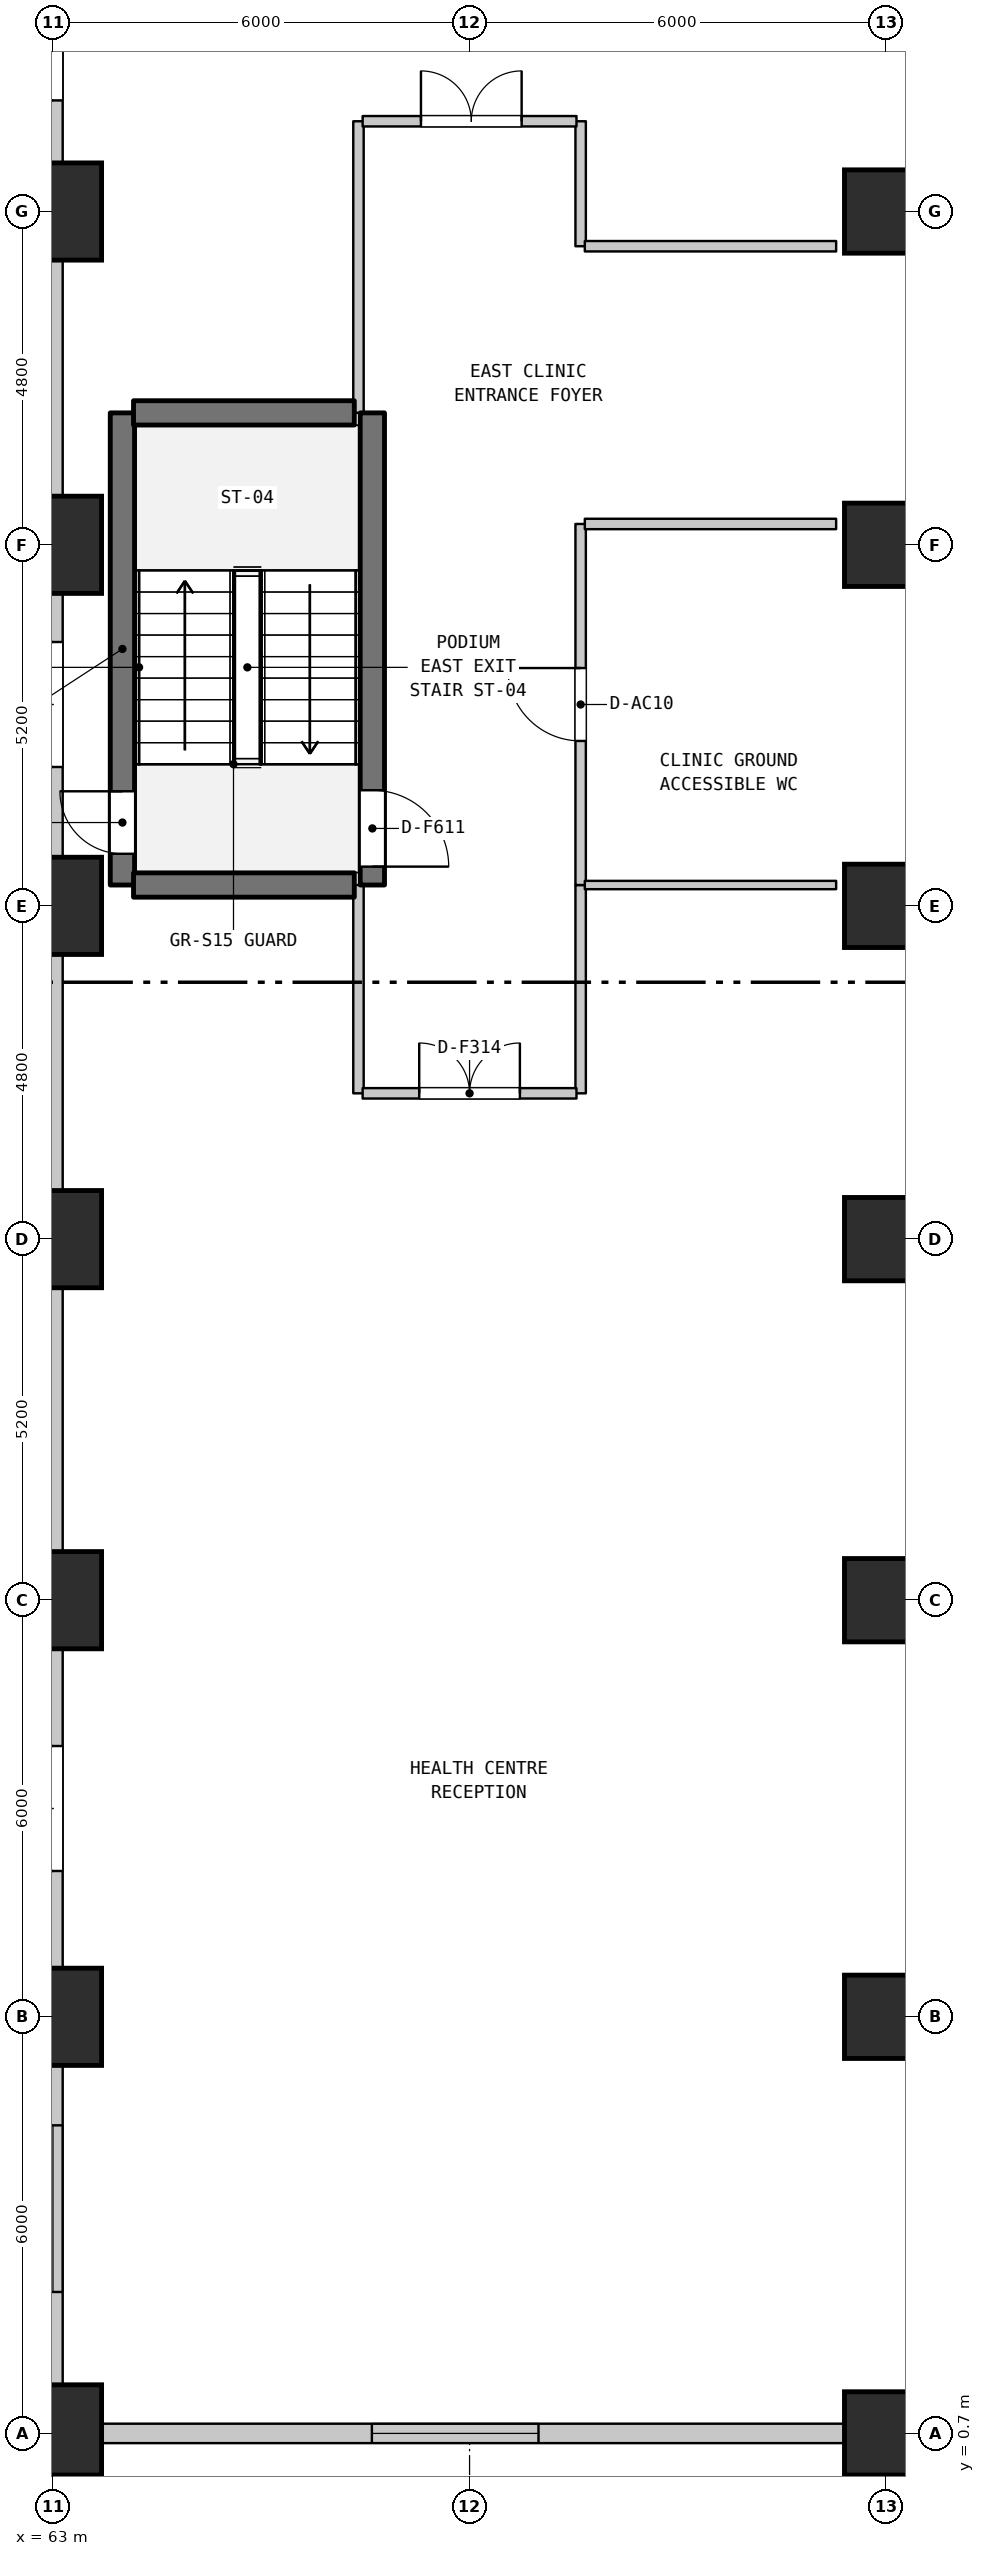
"""IFC4 building model, lengths in metres.
Left out: names, types, materials, properties, quantities, classifications, styles, units other than length and angle.
Written with IfcOpenShell. Run it as: python <this file> out.ifc"""

import sys

from ifc_helpers import new_model, si_unit, direction, frame, frame_2d, origin, origin_2d, place, context, subcontext, project, spatial, rectangle, extrude, element, fill, save


model = new_model("IFC4")
c1 = context("Model", 3, precision=1e-05, world=origin(), true_north=direction((0.0, 1.0)))
c2 = subcontext(c1, "Body", "Model", "MODEL_VIEW")
j1 = project(units=[si_unit("LENGTHUNIT", "METRE"), si_unit("PLANEANGLEUNIT", "RADIAN")], contexts=[c1])
p1 = place(None, origin())
s1 = spatial("IfcSite", under=j1, at=p1, CompositionType="ELEMENT")
p2 = place(p1, origin())
s2 = spatial("IfcBuilding", under=s1, at=p2, CompositionType="ELEMENT")
p3 = place(p2, origin())
s3 = spatial("IfcBuildingStorey", under=s2, at=p3, CompositionType="ELEMENT", Elevation=0.0)
for number, where, z_axis, x_axis in (
    (1, (63.0, 0.7, 0.0), (0.0, 0.0, 1.0), (1.0, 0.0, 0.0)),
    (2, (63.0, 6.7, 0.0), (0.0, 0.0, 1.0), (1.0, 0.0, 0.0)),
    (3, (63.0, 12.7, 0.0), (0.0, 0.0, 1.0), (1.0, 0.0, 0.0)),
    (4, (63.0, 17.9, 0.0), (0.0, 0.0, 1.0), (1.0, 0.0, 0.0)),
    (5, (63.0, 22.7, 0.0), (0.0, 0.0, 1.0), (1.0, 0.0, 0.0)),
    (6, (63.0, 27.9, 0.0), (0.0, 0.0, 1.0), (1.0, 0.0, 0.0)),
    (7, (63.0, 32.7, 0.0), (0.0, 0.0, 1.0), (1.0, 0.0, 0.0)),
):
    element("IfcColumn", number, at=place(p3, frame(where, z_axis=z_axis, x_axis=x_axis)), inside=s3, PredefinedType="PILASTER", context=c2, shape_type="SweptSolid", body=[
        extrude(rectangle(XDim=1.4, YDim=1.4, at=origin_2d()), origin(), (0.0, 0.0, 1.0), 6.5),
    ])
for number, where, z_axis, x_axis in (
    (8, (75.0, 0.7, 0.0), (0.0, 0.0, 1.0), (1.0, 0.0, 0.0)),
    (9, (75.0, 6.7, 0.0), (0.0, 0.0, 1.0), (1.0, 0.0, 0.0)),
    (10, (75.0, 12.7, 0.0), (0.0, 0.0, 1.0), (1.0, 0.0, 0.0)),
    (11, (75.0, 17.9, 0.0), (0.0, 0.0, 1.0), (1.0, 0.0, 0.0)),
    (12, (75.0, 22.7, 0.0), (0.0, 0.0, 1.0), (1.0, 0.0, 0.0)),
    (13, (75.0, 27.9, 0.0), (0.0, 0.0, 1.0), (1.0, 0.0, 0.0)),
    (14, (75.0, 32.7, 0.0), (0.0, 0.0, 1.0), (1.0, 0.0, 0.0)),
):
    element("IfcColumn", number, at=place(p3, frame(where, z_axis=z_axis, x_axis=x_axis)), inside=s3, PredefinedType="PILASTER", context=c2, shape_type="SweptSolid", body=[
        extrude(rectangle(XDim=1.2, YDim=1.2, at=origin_2d()), origin(), (0.0, 0.0, 1.0), 6.5),
    ])
p4 = place(p3, frame((76.707, 2.407, 0.0), z_axis=(0.0, 0.0, 1.0), x_axis=(-0.707106781187, -0.707106781187, 0.0)))
e15 = element("IfcWall", 15, at=p4, inside=s3, PredefinedType="STANDARD", context=c2, shape_type="SweptSolid", body=[
    extrude(rectangle(XDim=2.0, YDim=0.28, at=frame_2d((1.0, 0.0))), origin(), (0.0, 0.0, 1.0), 6.17),
])
p5 = place(p3, frame((75.293, 0.993, 0.0), z_axis=(0.0, 0.0, 1.0), x_axis=(-0.92383017907, -0.382802560388, 0.0)))
e16 = element("IfcWall", 16, at=p5, inside=s3, PredefinedType="STANDARD", context=c2, shape_type="SweptSolid", body=[
    extrude(rectangle(XDim=0.765, YDim=0.28, at=frame_2d((0.383, 0.0))), origin(), (0.0, 0.0, 1.0), 6.17),
])
p6 = place(p3, frame((74.586, 0.7, 0.0), z_axis=(0.0, 0.0, 1.0), x_axis=(-1.0, 0.0, 0.0)))
e17 = element("IfcWall", 17, at=p6, inside=s3, PredefinedType="STANDARD", context=c2, shape_type="SweptSolid", body=[
    extrude(rectangle(XDim=11.586, YDim=0.28, at=frame_2d((5.793, 0.0))), origin(), (0.0, 0.0, 1.0), 6.17),
])
p7 = place(p6, frame((4.593, 0.0, 0.9)))
e18 = element("IfcOpeningElement", 18, at=p7, cuts=e17, PredefinedType="OPENING", context=c2, shape_type="SweptSolid", body=[
    extrude(rectangle(XDim=2.4, YDim=2.4, at=frame_2d((1.2, 1.2))), frame((0.0, 0.15, 0.0), z_axis=(0.0, -1.0, 0.0), x_axis=(1.0, 0.0, 0.0)), (0.0, 0.0, 1.0), 0.3),
])
p8 = place(p3, frame((63.0, 0.7, 0.0), z_axis=(0.0, 0.0, 1.0), x_axis=(0.0, 1.0, 0.0)))
e19 = element("IfcWall", 19, at=p8, inside=s3, PredefinedType="STANDARD", context=c2, shape_type="SweptSolid", body=[
    extrude(rectangle(XDim=32.0, YDim=0.28, at=frame_2d((16.0, 0.0))), origin(), (0.0, 0.0, 1.0), 5.67),
])
p9 = place(p8, frame((8.1, 0.0, 0.0)))
e20 = element("IfcOpeningElement", 20, at=p9, cuts=e19, PredefinedType="OPENING", context=c2, shape_type="SweptSolid", body=[
    extrude(rectangle(XDim=1.8, YDim=2.4, at=frame_2d((0.9, 1.2))), frame((0.0, 0.15, 0.0), z_axis=(0.0, -1.0, 0.0), x_axis=(1.0, 0.0, 0.0)), (0.0, 0.0, 1.0), 0.3),
])
p10 = place(p8, frame((24.0, 0.0, 0.0)))
e21 = element("IfcOpeningElement", 21, at=p10, cuts=e19, PredefinedType="OPENING", context=c2, shape_type="SweptSolid", body=[
    extrude(rectangle(XDim=1.8, YDim=2.4, at=frame_2d((0.9, 1.2))), frame((0.0, 0.15, 0.0), z_axis=(0.0, -1.0, 0.0), x_axis=(1.0, 0.0, 0.0)), (0.0, 0.0, 1.0), 0.3),
])
p11 = place(p8, frame((2.037, 0.0, 0.9)))
e22 = element("IfcOpeningElement", 22, at=p11, cuts=e19, PredefinedType="OPENING", context=c2, shape_type="SweptSolid", body=[
    extrude(rectangle(XDim=2.4, YDim=2.4, at=frame_2d((1.2, 1.2))), frame((0.0, 0.15, 0.0), z_axis=(0.0, -1.0, 0.0), x_axis=(1.0, 0.0, 0.0)), (0.0, 0.0, 1.0), 0.3),
])
p12 = place(p3, frame((64.0, 23.0, 0.0), z_axis=(0.0, 0.0, 1.0), x_axis=(0.0, 1.0, 0.0)))
e23 = element("IfcWall", 23, at=p12, inside=s3, PredefinedType="SHEAR", context=c2, shape_type="SweptSolid", body=[
    extrude(rectangle(XDim=6.8, YDim=0.35, at=frame_2d((3.4, 0.0))), origin(), (0.0, 0.0, 1.0), 6.17),
])
p13 = place(p12, frame((0.45, 0.0, 0.0)))
e24 = element("IfcOpeningElement", 24, at=p13, cuts=e23, PredefinedType="OPENING", context=c2, shape_type="SweptSolid", body=[
    extrude(rectangle(XDim=0.9, YDim=2.15, at=frame_2d((0.45, 1.075))), frame((0.0, 0.185, 0.0), z_axis=(0.0, -1.0, 0.0), x_axis=(1.0, 0.0, 0.0)), (0.0, 0.0, 1.0), 0.37),
])
p14 = place(p3, frame((67.4, 20.0, 0.0), z_axis=(0.0, 0.0, 1.0), x_axis=(0.0, 1.0, 0.0)))
e25 = element("IfcWall", 25, at=p14, inside=s3, PredefinedType="STANDARD", context=c2, shape_type="SweptSolid", body=[
    extrude(rectangle(XDim=3.0, YDim=0.15, at=frame_2d((1.5, 0.0))), origin(), (0.0, 0.0, 1.0), 6.17),
])
p15 = place(p3, frame((67.4, 29.8, 0.0), z_axis=(0.0, 0.0, 1.0), x_axis=(0.0, 1.0, 0.0)))
e26 = element("IfcWall", 26, at=p15, inside=s3, PredefinedType="STANDARD", context=c2, shape_type="SweptSolid", body=[
    extrude(rectangle(XDim=4.2, YDim=0.15, at=frame_2d((2.1, 0.0))), origin(), (0.0, 0.0, 1.0), 6.17),
])
p16 = place(p3, frame((67.6, 23.0, 0.0), z_axis=(0.0, 0.0, 1.0), x_axis=(0.0, 1.0, 0.0)))
e27 = element("IfcWall", 27, at=p16, inside=s3, PredefinedType="SHEAR", context=c2, shape_type="SweptSolid", body=[
    extrude(rectangle(XDim=6.8, YDim=0.35, at=frame_2d((3.4, 0.0))), origin(), (0.0, 0.0, 1.0), 6.17),
])
p17 = place(p16, frame((0.265, 0.0, 0.0)))
e28 = element("IfcOpeningElement", 28, at=p17, cuts=e27, PredefinedType="OPENING", context=c2, shape_type="SweptSolid", body=[
    extrude(rectangle(XDim=1.1, YDim=2.15, at=frame_2d((0.55, 1.075))), frame((0.0, 0.185, 0.0), z_axis=(0.0, -1.0, 0.0), x_axis=(1.0, 0.0, 0.0)), (0.0, 0.0, 1.0), 0.37),
])
p18 = place(p3, frame((70.6, 20.0, 0.0), z_axis=(0.0, 0.0, 1.0), x_axis=(0.0, 1.0, 0.0)))
e29 = element("IfcWall", 29, at=p18, inside=s3, PredefinedType="STANDARD", context=c2, shape_type="SweptSolid", body=[
    extrude(rectangle(XDim=3.0, YDim=0.15, at=frame_2d((1.5, 0.0))), origin(), (0.0, 0.0, 1.0), 6.17),
])
p19 = place(p3, frame((70.6, 23.0, 0.0), z_axis=(0.0, 0.0, 1.0), x_axis=(0.0, 1.0, 0.0)))
e30 = element("IfcWall", 30, at=p19, inside=s3, PredefinedType="STANDARD", context=c2, shape_type="SweptSolid", body=[
    extrude(rectangle(XDim=5.2, YDim=0.15, at=frame_2d((2.6, 0.0))), origin(), (0.0, 0.0, 1.0), 6.17),
])
p20 = place(p19, frame((2.075, 0.0, 0.0)))
e31 = element("IfcOpeningElement", 31, at=p20, cuts=e30, PredefinedType="OPENING", context=c2, shape_type="SweptSolid", body=[
    extrude(rectangle(XDim=1.05, YDim=2.15, at=frame_2d((0.525, 1.075))), frame((0.0, 0.085, 0.0), z_axis=(0.0, -1.0, 0.0), x_axis=(1.0, 0.0, 0.0)), (0.0, 0.0, 1.0), 0.17),
])
p21 = place(p3, frame((70.6, 32.2, 0.0), z_axis=(0.0, 0.0, 1.0), x_axis=(0.0, 1.0, 0.0)))
e32 = element("IfcWall", 32, at=p21, inside=s3, PredefinedType="STANDARD", context=c2, shape_type="SweptSolid", body=[
    extrude(rectangle(XDim=1.8, YDim=0.15, at=frame_2d((0.9, 0.0))), origin(), (0.0, 0.0, 1.0), 6.17),
])
p22 = place(p3, frame((67.46, 20.0, 0.0), z_axis=(0.0, 0.0, 1.0), x_axis=(1.0, 0.0, 0.0)))
e33 = element("IfcWall", 33, at=p22, inside=s3, PredefinedType="STANDARD", context=c2, shape_type="SweptSolid", body=[
    extrude(rectangle(XDim=3.08, YDim=0.15, at=frame_2d((1.54, 0.0))), origin(), (0.0, 0.0, 1.0), 6.17),
])
p23 = place(p22, frame((0.815, 0.0, 0.0)))
e34 = element("IfcOpeningElement", 34, at=p23, cuts=e33, PredefinedType="OPENING", context=c2, shape_type="SweptSolid", body=[
    extrude(rectangle(XDim=1.45, YDim=2.2, at=frame_2d((0.725, 1.1))), frame((0.0, 0.085, 0.0), z_axis=(0.0, -1.0, 0.0), x_axis=(1.0, 0.0, 0.0)), (0.0, 0.0, 1.0), 0.17),
])
p24 = place(p3, frame((64.16, 23.0, 0.0), z_axis=(0.0, 0.0, 1.0), x_axis=(1.0, 0.0, 0.0)))
e35 = element("IfcWall", 35, at=p24, inside=s3, PredefinedType="SHEAR", context=c2, shape_type="SweptSolid", body=[
    extrude(rectangle(XDim=3.18, YDim=0.35, at=frame_2d((1.59, 0.0))), origin(), (0.0, 0.0, 1.0), 6.17),
])
p25 = place(p3, frame((70.66, 23.0, 0.0), z_axis=(0.0, 0.0, 1.0), x_axis=(1.0, 0.0, 0.0)))
e36 = element("IfcWall", 36, at=p25, inside=s3, PredefinedType="PARTITIONING", context=c2, shape_type="SweptSolid", body=[
    extrude(rectangle(XDim=3.62, YDim=0.12, at=frame_2d((1.81, 0.0))), origin(), (0.0, 0.0, 1.0), 6.17),
])
p26 = place(p3, frame((70.66, 28.2, 0.0), z_axis=(0.0, 0.0, 1.0), x_axis=(1.0, 0.0, 0.0)))
e37 = element("IfcWall", 37, at=p26, inside=s3, PredefinedType="STANDARD", context=c2, shape_type="SweptSolid", body=[
    extrude(rectangle(XDim=3.62, YDim=0.15, at=frame_2d((1.81, 0.0))), origin(), (0.0, 0.0, 1.0), 6.17),
])
p27 = place(p3, frame((64.16, 29.8, 0.0), z_axis=(0.0, 0.0, 1.0), x_axis=(1.0, 0.0, 0.0)))
e38 = element("IfcWall", 38, at=p27, inside=s3, PredefinedType="SHEAR", context=c2, shape_type="SweptSolid", body=[
    extrude(rectangle(XDim=3.18, YDim=0.35, at=frame_2d((1.59, 0.0))), origin(), (0.0, 0.0, 1.0), 6.17),
])
p28 = place(p3, frame((70.66, 32.2, 0.0), z_axis=(0.0, 0.0, 1.0), x_axis=(1.0, 0.0, 0.0)))
e39 = element("IfcWall", 39, at=p28, inside=s3, PredefinedType="STANDARD", context=c2, shape_type="SweptSolid", body=[
    extrude(rectangle(XDim=3.62, YDim=0.15, at=frame_2d((1.81, 0.0))), origin(), (0.0, 0.0, 1.0), 6.17),
])
p29 = place(p3, frame((67.46, 34.0, 0.0), z_axis=(0.0, 0.0, 1.0), x_axis=(1.0, 0.0, 0.0)))
e40 = element("IfcWall", 40, at=p29, inside=s3, PredefinedType="STANDARD", context=c2, shape_type="SweptSolid", body=[
    extrude(rectangle(XDim=3.08, YDim=0.15, at=frame_2d((1.54, 0.0))), origin(), (0.0, 0.0, 1.0), 6.17),
])
p30 = place(p29, frame((0.84, 0.0, 0.0)))
e41 = element("IfcOpeningElement", 41, at=p30, cuts=e40, PredefinedType="OPENING", context=c2, shape_type="SweptSolid", body=[
    extrude(rectangle(XDim=1.45, YDim=2.2, at=frame_2d((0.725, 1.1))), frame((0.0, 0.085, 0.0), z_axis=(0.0, -1.0, 0.0), x_axis=(1.0, 0.0, 0.0)), (0.0, 0.0, 1.0), 0.17),
])
p31 = place(p3, frame((63.0, 32.7, 0.0), z_axis=(0.0, 0.0, 1.0), x_axis=(0.0, 1.0, 0.0)))
e42 = element("IfcWall", 42, at=p31, inside=s3, PredefinedType="STANDARD", context=c2, shape_type="SweptSolid", body=[
    extrude(rectangle(XDim=21.4, YDim=0.28, at=frame_2d((10.7, 0.0))), origin(), (0.0, 0.0, 1.0), 5.57),
])
p32 = place(p31, frame((1.6, 0.0, 0.0)))
e43 = element("IfcOpeningElement", 43, at=p32, cuts=e42, PredefinedType="OPENING", context=c2, shape_type="SweptSolid", body=[
    extrude(rectangle(XDim=1.8, YDim=2.4, at=frame_2d((0.9, 1.2))), frame((0.0, 0.15, 0.0), z_axis=(0.0, -1.0, 0.0), x_axis=(1.0, 0.0, 0.0)), (0.0, 0.0, 1.0), 0.3),
])
p33 = place(p31, frame((7.6, 0.0, 0.0)))
e44 = element("IfcOpeningElement", 44, at=p33, cuts=e42, PredefinedType="OPENING", context=c2, shape_type="SweptSolid", body=[
    extrude(rectangle(XDim=1.8, YDim=2.4, at=frame_2d((0.9, 1.2))), frame((0.0, 0.15, 0.0), z_axis=(0.0, -1.0, 0.0), x_axis=(1.0, 0.0, 0.0)), (0.0, 0.0, 1.0), 0.3),
])
p34 = place(p31, frame((14.6, 0.0, 0.0)))
e45 = element("IfcOpeningElement", 45, at=p34, cuts=e42, PredefinedType="OPENING", context=c2, shape_type="SweptSolid", body=[
    extrude(rectangle(XDim=1.8, YDim=2.4, at=frame_2d((0.9, 1.2))), frame((0.0, 0.15, 0.0), z_axis=(0.0, -1.0, 0.0), x_axis=(1.0, 0.0, 0.0)), (0.0, 0.0, 1.0), 0.3),
])
p35 = place(p31, frame((9.938, 0.0, 0.9)))
e46 = element("IfcOpeningElement", 46, at=p35, cuts=e42, PredefinedType="OPENING", context=c2, shape_type="SweptSolid", body=[
    extrude(rectangle(XDim=2.4, YDim=2.4, at=frame_2d((1.2, 1.2))), frame((0.0, 0.15, 0.0), z_axis=(0.0, -1.0, 0.0), x_axis=(1.0, 0.0, 0.0)), (0.0, 0.0, 1.0), 0.3),
])
p36 = place(p31, frame((16.962, 0.0, 0.9)))
e47 = element("IfcOpeningElement", 47, at=p36, cuts=e42, PredefinedType="OPENING", context=c2, shape_type="SweptSolid", body=[
    extrude(rectangle(XDim=2.4, YDim=2.4, at=frame_2d((1.2, 1.2))), frame((0.0, 0.15, 0.0), z_axis=(0.0, -1.0, 0.0), x_axis=(1.0, 0.0, 0.0)), (0.0, 0.0, 1.0), 0.3),
])
p37 = place(p7, origin())
e48 = element("IfcWindow", 48, at=p37, inside=s3, PartitioningType="DOUBLE_PANEL_VERTICAL", PredefinedType="WINDOW", context=c2, shape_type="SweptSolid", body=[
    extrude(rectangle(XDim=2.4, YDim=2.4, at=frame_2d((1.2, 1.2))), frame((0.0, 0.03, 0.0), z_axis=(0.0, -1.0, 0.0), x_axis=(1.0, 0.0, 0.0)), (0.0, 0.0, 1.0), 0.06),
])
fill(e18, e48)
p38 = place(p9, origin())
e49 = element("IfcDoor", 49, at=p38, inside=s3, OperationType="DOUBLE_DOOR_SINGLE_SWING", PredefinedType="DOOR", context=c2, shape_type="SweptSolid", body=[
    extrude(rectangle(XDim=1.8, YDim=2.4, at=frame_2d((0.9, 1.2))), frame((0.0, 0.025, 0.0), z_axis=(0.0, -1.0, 0.0), x_axis=(1.0, 0.0, 0.0)), (0.0, 0.0, 1.0), 0.05),
])
fill(e20, e49)
p39 = place(p32, origin())
e50 = element("IfcDoor", 50, at=p39, inside=s3, OperationType="DOUBLE_DOOR_SINGLE_SWING", PredefinedType="DOOR", context=c2, shape_type="SweptSolid", body=[
    extrude(rectangle(XDim=1.8, YDim=2.4, at=frame_2d((0.9, 1.2))), frame((0.0, 0.025, 0.0), z_axis=(0.0, -1.0, 0.0), x_axis=(1.0, 0.0, 0.0)), (0.0, 0.0, 1.0), 0.05),
])
fill(e43, e50)
p40 = place(p10, origin())
e51 = element("IfcDoor", 51, at=p40, inside=s3, OperationType="DOUBLE_DOOR_SINGLE_SWING", PredefinedType="DOOR", context=c2, shape_type="SweptSolid", body=[
    extrude(rectangle(XDim=1.8, YDim=2.4, at=frame_2d((0.9, 1.2))), frame((0.0, 0.025, 0.0), z_axis=(0.0, -1.0, 0.0), x_axis=(1.0, 0.0, 0.0)), (0.0, 0.0, 1.0), 0.05),
])
fill(e21, e51)
p41 = place(p11, origin())
e52 = element("IfcWindow", 52, at=p41, inside=s3, PartitioningType="DOUBLE_PANEL_VERTICAL", PredefinedType="WINDOW", context=c2, shape_type="SweptSolid", body=[
    extrude(rectangle(XDim=2.4, YDim=2.4, at=frame_2d((1.2, 1.2))), frame((0.0, 0.03, 0.0), z_axis=(0.0, -1.0, 0.0), x_axis=(1.0, 0.0, 0.0)), (0.0, 0.0, 1.0), 0.06),
])
fill(e22, e52)
p42 = place(p13, origin())
e53 = element("IfcDoor", 53, at=p42, inside=s3, OperationType="SINGLE_SWING_RIGHT", PredefinedType="DOOR", context=c2, shape_type="SweptSolid", body=[
    extrude(rectangle(XDim=0.9, YDim=2.15, at=frame_2d((0.45, 1.075))), frame((0.0, 0.025, 0.0), z_axis=(0.0, -1.0, 0.0), x_axis=(1.0, 0.0, 0.0)), (0.0, 0.0, 1.0), 0.05),
])
fill(e24, e53)
p43 = place(p17, frame((1.1, 0.0, 0.0), z_axis=(0.0, 0.0, 1.0), x_axis=(-1.0, 0.0, 0.0)))
e54 = element("IfcDoor", 54, at=p43, inside=s3, OperationType="SINGLE_SWING_LEFT", PredefinedType="DOOR", context=c2, shape_type="SweptSolid", body=[
    extrude(rectangle(XDim=1.1, YDim=2.15, at=frame_2d((0.55, 1.075))), frame((0.0, 0.025, 0.0), z_axis=(0.0, -1.0, 0.0), x_axis=(1.0, 0.0, 0.0)), (0.0, 0.0, 1.0), 0.05),
])
fill(e28, e54)
p44 = place(p20, origin())
e55 = element("IfcDoor", 55, at=p44, inside=s3, OperationType="SINGLE_SWING_RIGHT", PredefinedType="DOOR", context=c2, shape_type="SweptSolid", body=[
    extrude(rectangle(XDim=1.05, YDim=2.15, at=frame_2d((0.525, 1.075))), frame((0.0, 0.025, 0.0), z_axis=(0.0, -1.0, 0.0), x_axis=(1.0, 0.0, 0.0)), (0.0, 0.0, 1.0), 0.05),
])
fill(e31, e55)
p45 = place(p23, origin())
e56 = element("IfcDoor", 56, at=p45, inside=s3, OperationType="DOUBLE_DOOR_SINGLE_SWING", PredefinedType="DOOR", context=c2, shape_type="SweptSolid", body=[
    extrude(rectangle(XDim=1.45, YDim=2.2, at=frame_2d((0.725, 1.1))), frame((0.0, 0.025, 0.0), z_axis=(0.0, -1.0, 0.0), x_axis=(1.0, 0.0, 0.0)), (0.0, 0.0, 1.0), 0.05),
])
fill(e34, e56)
p46 = place(p30, origin())
e57 = element("IfcDoor", 57, at=p46, inside=s3, OperationType="DOUBLE_DOOR_SINGLE_SWING", PredefinedType="DOOR", context=c2, shape_type="SweptSolid", body=[
    extrude(rectangle(XDim=1.45, YDim=2.2, at=frame_2d((0.725, 1.1))), frame((0.0, 0.025, 0.0), z_axis=(0.0, -1.0, 0.0), x_axis=(1.0, 0.0, 0.0)), (0.0, 0.0, 1.0), 0.05),
])
fill(e41, e57)
save(model, sys.argv[1])
